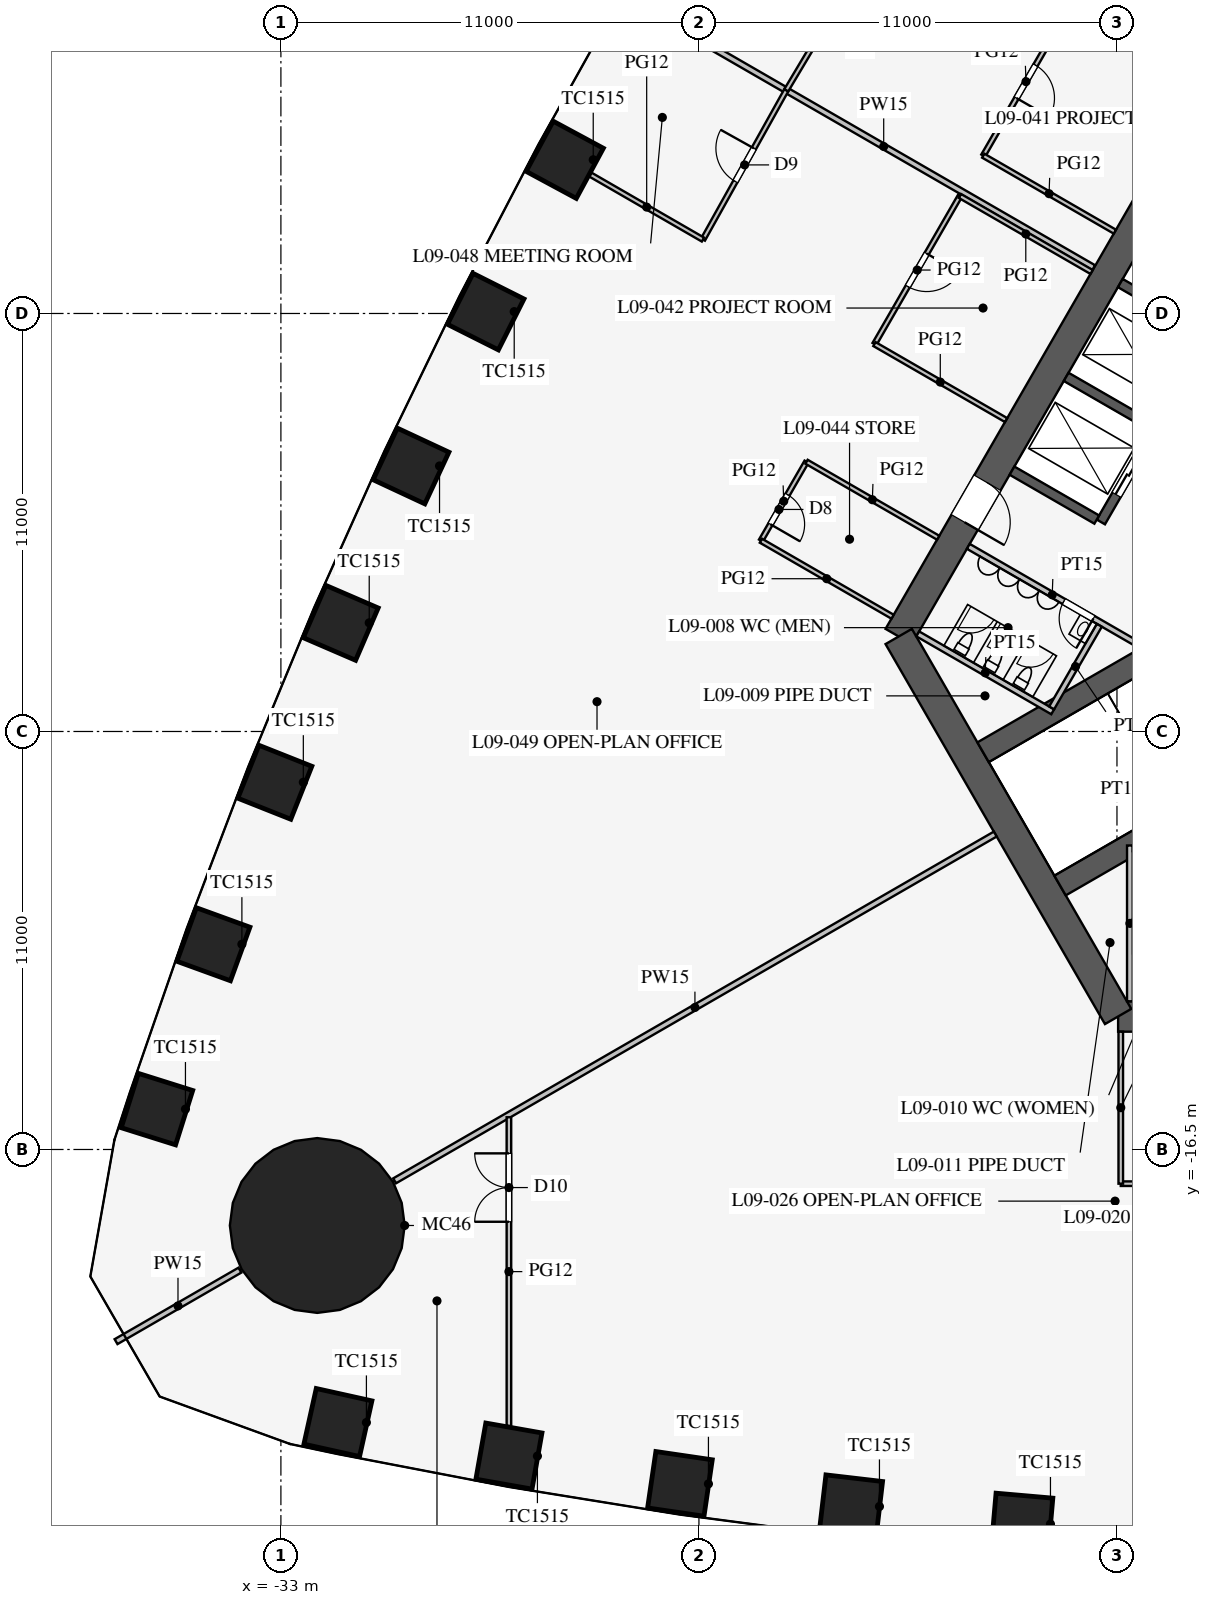
"""IFC4 building model, lengths in metres.
Left out: names, types, materials, properties, quantities, classifications, styles, units other than length and angle.
Written with IfcOpenShell. Run it as: python <this file> out.ifc"""

import sys

from ifc_helpers import new_model, si_unit, direction, frame, frame_2d, origin, origin_2d, place, context, subcontext, project, spatial, rectangle, circle, extrude, element, fill, save


model = new_model("IFC4")
c1 = context("Model", 3, precision=1e-05, world=origin(), true_north=direction((0.0, 1.0)))
c2 = subcontext(c1, "Body", "Model", "MODEL_VIEW")
j1 = project(units=[si_unit("LENGTHUNIT", "METRE"), si_unit("PLANEANGLEUNIT", "RADIAN")], contexts=[c1])
p1 = place(None, origin())
s1 = spatial("IfcSite", under=j1, at=p1, CompositionType="ELEMENT")
p2 = place(p1, origin())
s2 = spatial("IfcBuilding", under=s1, at=p2, CompositionType="ELEMENT")
p3 = place(p2, frame((0.0, 0.0, 41.7)))
s3 = spatial("IfcBuildingStorey", under=s2, at=p3, CompositionType="ELEMENT", Elevation=41.7)
for number, where, z_axis, x_axis in (
    (1, (-31.5, -23.685, 0.0), (0.0, 0.0, 1.0), (0.976, -0.217, 0.0)),
    (2, (-27.0, -24.568, 0.0), (0.0, 0.0, 1.0), (0.985, -0.174, 0.0)),
    (3, (-22.5, -25.299, 0.0), (0.0, 0.0, 1.0), (0.989, -0.145, 0.0)),
    (4, (-18.0, -25.895, 0.0), (0.0, 0.0, 1.0), (0.993, -0.116, 0.0)),
    (5, (-13.5, -26.357, 0.0), (0.0, 0.0, 1.0), (0.996, -0.087, 0.0)),
    (6, (-25.531, 9.544, 0.0), (0.0, 0.0, 1.0), (-0.475, -0.88, 0.0)),
    (7, (-27.611, 5.549, 0.0), (0.0, 0.0, 1.0), (-0.449, -0.894, 0.0)),
    (8, (-29.576, 1.487, 0.0), (0.0, 0.0, 1.0), (-0.423, -0.906, 0.0)),
    (9, (-31.426, -2.641, 0.0), (0.0, 0.0, 1.0), (-0.396, -0.918, 0.0)),
    (10, (-33.16, -6.836, 0.0), (0.0, 0.0, 1.0), (-0.369, -0.929, 0.0)),
    (11, (-34.776, -11.099, 0.0), (0.0, 0.0, 1.0), (-0.342, -0.94, 0.0)),
    (12, (-36.262, -15.438, 0.0), (0.0, 0.0, 1.0), (-0.3, -0.954, 0.0)),
):
    element("IfcColumn", number, at=place(p3, frame(where, z_axis=z_axis, x_axis=x_axis)), inside=s3, PredefinedType="COLUMN", context=c2, shape_type="SweptSolid", body=[
        extrude(rectangle(XDim=1.5, YDim=1.5, at=origin_2d()), origin(), (0.0, 0.0, 1.0), 4.2),
    ])
p4 = place(p3, frame((-32.043, -18.5, 0.0), z_axis=(0.0, 0.0, 1.0), x_axis=(1.0, 0.0, 0.0)))
e13 = element("IfcColumn", 13, at=p4, inside=s3, PredefinedType="COLUMN", context=c2, shape_type="SweptSolid", body=[
    extrude(circle(Radius=2.3, at=origin_2d()), origin(), (0.0, 0.0, 1.0), 4.2),
])
p5 = place(p3, frame((-10.97, -13.0, 0.0), z_axis=(0.0, 0.0, 1.0), x_axis=(1.0, 0.0, 0.0)))
e14 = element("IfcWall", 14, at=p5, inside=s3, PredefinedType="SHEAR", context=c2, shape_type="SweptSolid", body=[
    extrude(rectangle(XDim=21.939, YDim=0.8, at=frame_2d((10.97, 0.0))), origin(), (0.0, 0.0, 1.0), 4.2),
])
p6 = place(p5, frame((17.27, 0.0, 0.0)))
e15 = element("IfcOpeningElement", 15, at=p6, cuts=e14, PredefinedType="OPENING", context=c2, shape_type="SweptSolid", body=[
    extrude(rectangle(XDim=1.2, YDim=2.1, at=frame_2d((0.6, 1.05))), frame((0.0, 0.41, 0.0), z_axis=(0.0, -1.0, 0.0), x_axis=(1.0, 0.0, 0.0)), (0.0, 0.0, 1.0), 0.82),
])
p7 = place(p5, frame((3.47, 0.0, 0.0)))
e16 = element("IfcOpeningElement", 16, at=p7, cuts=e14, PredefinedType="OPENING", context=c2, shape_type="SweptSolid", body=[
    extrude(rectangle(XDim=1.2, YDim=2.1, at=frame_2d((0.6, 1.05))), frame((0.0, 0.41, 0.0), z_axis=(0.0, -1.0, 0.0), x_axis=(1.0, 0.0, 0.0)), (0.0, 0.0, 1.0), 0.82),
])
p8 = place(p3, frame((-5.773, 16.0, 0.0), z_axis=(0.0, 0.0, 1.0), x_axis=(-0.500002442456, -0.866023993627, 0.0)))
e17 = element("IfcWall", 17, at=p8, inside=s3, PredefinedType="SHEAR", context=c2, shape_type="SweptSolid", body=[
    extrude(rectangle(XDim=21.939, YDim=0.8, at=frame_2d((10.97, 0.0))), origin(), (0.0, 0.0, 1.0), 4.2),
])
p9 = place(p8, frame((17.27, 0.0, 0.0)))
e18 = element("IfcOpeningElement", 18, at=p9, cuts=e17, PredefinedType="OPENING", context=c2, shape_type="SweptSolid", body=[
    extrude(rectangle(XDim=1.2, YDim=2.1, at=frame_2d((0.6, 1.05))), frame((0.0, 0.41, 0.0), z_axis=(0.0, -1.0, 0.0), x_axis=(1.0, 0.0, 0.0)), (0.0, 0.0, 1.0), 0.82),
])
p10 = place(p8, frame((3.47, 0.0, 0.0)))
e19 = element("IfcOpeningElement", 19, at=p10, cuts=e17, PredefinedType="OPENING", context=c2, shape_type="SweptSolid", body=[
    extrude(rectangle(XDim=1.2, YDim=2.1, at=frame_2d((0.6, 1.05))), frame((0.0, 0.41, 0.0), z_axis=(0.0, -1.0, 0.0), x_axis=(1.0, 0.0, 0.0)), (0.0, 0.0, 1.0), 0.82),
])
p11 = place(p3, frame((-16.743, -3.0, 0.0), z_axis=(0.0, 0.0, 1.0), x_axis=(0.499995765644, -0.866027848477, 0.0)))
e20 = element("IfcWall", 20, at=p11, inside=s3, PredefinedType="SHEAR", context=c2, shape_type="SweptSolid", body=[
    extrude(rectangle(XDim=11.547, YDim=0.8, at=frame_2d((5.773, 0.0))), origin(), (0.0, 0.0, 1.0), 4.2),
])
p12 = place(p3, frame((-5.724, 9.886, 0.0), z_axis=(0.0, 0.0, 1.0), x_axis=(-0.500001763848, -0.866024385424, 0.0)))
e21 = element("IfcWall", 21, at=p12, inside=s3, PredefinedType="SHEAR", context=c2, shape_type="SweptSolid", body=[
    extrude(rectangle(XDim=11.4, YDim=0.25, at=frame_2d((5.7, 0.0))), origin(), (0.0, 0.0, 1.0), 4.2),
])
p13 = place(p12, frame((6.525, 0.0, 0.0)))
e22 = element("IfcOpeningElement", 22, at=p13, cuts=e21, PredefinedType="OPENING", context=c2, shape_type="SweptSolid", body=[
    extrude(rectangle(XDim=1.2, YDim=2.2, at=frame_2d((0.6, 1.1))), frame((0.0, 0.135, 0.0), z_axis=(0.0, -1.0, 0.0), x_axis=(1.0, 0.0, 0.0)), (0.0, 0.0, 1.0), 0.27),
])
p14 = place(p12, frame((9.375, 0.0, 0.0)))
e23 = element("IfcOpeningElement", 23, at=p14, cuts=e21, PredefinedType="OPENING", context=c2, shape_type="SweptSolid", body=[
    extrude(rectangle(XDim=1.2, YDim=2.2, at=frame_2d((0.6, 1.1))), frame((0.0, 0.135, 0.0), z_axis=(0.0, -1.0, 0.0), x_axis=(1.0, 0.0, 0.0)), (0.0, 0.0, 1.0), 0.27),
])
for number, where, z_axis, x_axis in (
    (24, (-8.682, 5.012, 0.0), (0.0, 0.0, 1.0), (-0.866, 0.5, 0.0)),
    (25, (-10.107, 2.544, 0.0), (0.0, 0.0, 1.0), (-0.866, 0.5, 0.0)),
    (26, (-11.532, 0.076, 0.0), (0.0, 0.0, 1.0), (-0.866, 0.5, 0.0)),
):
    element("IfcWall", number, at=place(p3, frame(where, z_axis=z_axis, x_axis=x_axis)), inside=s3, PredefinedType="SHEAR", context=c2, shape_type="SweptSolid", body=[
        extrude(rectangle(XDim=2.575, YDim=0.25, at=frame_2d((1.288, 0.0))), origin(), (0.0, 0.0, 1.0), 4.2),
    ])
for number, where, z_axis, x_axis in (
    (27, (-6.663, -1.509, 0.0), (0.0, 0.0, 1.0), (-0.866, -0.5, 0.0)),
    (28, (-4.638, -5.016, 0.0), (0.0, 0.0, 1.0), (-0.866, -0.5, 0.0)),
):
    element("IfcWall", number, at=place(p3, frame(where, z_axis=z_axis, x_axis=x_axis)), inside=s3, PredefinedType="SHEAR", context=c2, shape_type="SweptSolid", body=[
        extrude(rectangle(XDim=9.075, YDim=0.6, at=frame_2d((4.538, 0.0))), origin(), (0.0, 0.0, 1.0), 4.2),
    ])
p15 = place(p3, frame((-10.495, -3.178, 0.0), z_axis=(0.0, 0.0, 1.0), x_axis=(-0.86602216432, 0.500005610874, 0.0)))
e29 = element("IfcWall", 29, at=p15, inside=s3, PredefinedType="PARTITIONING", context=c2, shape_type="SweptSolid", body=[
    extrude(rectangle(XDim=5.1, YDim=0.15, at=frame_2d((2.55, 0.0))), origin(), (0.0, 0.0, 1.0), 4.0),
])
p16 = place(p15, frame((1.3, 0.0, 0.0)))
e30 = element("IfcOpeningElement", 30, at=p16, cuts=e29, PredefinedType="OPENING", context=c2, shape_type="SweptSolid", body=[
    extrude(rectangle(XDim=0.9, YDim=2.1, at=frame_2d((0.45, 1.05))), frame((0.0, 0.085, 0.0), z_axis=(0.0, -1.0, 0.0), x_axis=(1.0, 0.0, 0.0)), (0.0, 0.0, 1.0), 0.17),
])
p17 = place(p3, frame((-12.691, -4.982, 0.0), z_axis=(0.0, 0.0, 1.0), x_axis=(-0.8660249478, 0.500000789788, 0.0)))
e31 = element("IfcWall", 31, at=p17, inside=s3, PredefinedType="PARTITIONING", context=c2, shape_type="SweptSolid", body=[
    extrude(rectangle(XDim=4.1, YDim=0.15, at=frame_2d((2.05, 0.0))), origin(), (0.0, 0.0, 1.0), 4.0),
])
p18 = place(p3, frame((-11.464, -2.706, 0.0), z_axis=(0.0, 0.0, 1.0), x_axis=(-0.50001992892, -0.866013897511, 0.0)))
e32 = element("IfcWall", 32, at=p18, inside=s3, PredefinedType="PARTITIONING", context=c2, shape_type="SweptSolid", body=[
    extrude(rectangle(XDim=2.51, YDim=0.15, at=frame_2d((1.255, 0.0))), origin(), (0.0, 0.0, 1.0), 4.0),
])
p19 = place(p3, frame((-10.66, -8.5, 0.0), z_axis=(0.0, 0.0, 1.0), x_axis=(0.0, -1.0, 0.0)))
e33 = element("IfcWall", 33, at=p19, inside=s3, PredefinedType="PARTITIONING", context=c2, shape_type="SweptSolid", body=[
    extrude(rectangle(XDim=4.1, YDim=0.15, at=frame_2d((2.05, 0.0))), origin(), (0.0, 0.0, 1.0), 4.0),
])
p20 = place(p3, frame((-14.203, -8.2, 0.0), z_axis=(0.0, 0.0, 1.0), x_axis=(-0.866024965723, -0.500000758745, 0.0)))
e34 = element("IfcWall", 34, at=p20, inside=s3, PredefinedType="PARTITIONING", context=c2, shape_type="SweptSolid", body=[
    extrude(rectangle(XDim=18.25, YDim=0.15, at=frame_2d((9.125, 0.0))), origin(), (0.0, 0.0, 1.0), 2.3),
])
p21 = place(p3, frame((-34.078, -19.675, 0.0), z_axis=(0.0, 0.0, 1.0), x_axis=(-0.866019247219, -0.500010663332, 0.0)))
e35 = element("IfcWall", 35, at=p21, inside=s3, PredefinedType="PARTITIONING", context=c2, shape_type="SweptSolid", body=[
    extrude(rectangle(XDim=3.764, YDim=0.15, at=frame_2d((1.882, 0.0))), origin(), (0.0, 0.0, 1.0), 2.3),
])
p22 = place(p3, frame((-10.9, -17.4, 0.0), z_axis=(0.0, 0.0, 1.0), x_axis=(1.0, 0.0, 0.0)))
e36 = element("IfcWall", 36, at=p22, inside=s3, PredefinedType="PARTITIONING", context=c2, shape_type="SweptSolid", body=[
    extrude(rectangle(XDim=2.4, YDim=0.12, at=frame_2d((1.2, 0.0))), origin(), (0.0, 0.0, 1.0), 2.9),
])
p23 = place(p22, frame((0.75, 0.0, 0.15)))
e37 = element("IfcOpeningElement", 37, at=p23, cuts=e36, PredefinedType="OPENING", context=c2, shape_type="SweptSolid", body=[
    extrude(rectangle(XDim=0.9, YDim=2.1, at=frame_2d((0.45, 1.05))), frame((0.0, 0.07, 0.0), z_axis=(0.0, -1.0, 0.0), x_axis=(1.0, 0.0, 0.0)), (0.0, 0.0, 1.0), 0.14),
])
p24 = place(p3, frame((-10.9, -13.4, 0.0), z_axis=(0.0, 0.0, 1.0), x_axis=(0.0, -1.0, 0.0)))
e38 = element("IfcWall", 38, at=p24, inside=s3, PredefinedType="PARTITIONING", context=c2, shape_type="SweptSolid", body=[
    extrude(rectangle(XDim=4.0, YDim=0.12, at=frame_2d((2.0, 0.0))), origin(), (0.0, 0.0, 1.0), 2.9),
])
p25 = place(p3, frame((-27.0, -15.652, 0.0), z_axis=(0.0, 0.0, 1.0), x_axis=(0.0, -1.0, 0.0)))
e39 = element("IfcWall", 39, at=p25, inside=s3, PredefinedType="PARTITIONING", context=c2, shape_type="SweptSolid", body=[
    extrude(rectangle(XDim=8.124, YDim=0.12, at=frame_2d((4.062, 0.0))), origin(), (0.0, 0.0, 1.0), 2.9),
])
p26 = place(p25, frame((0.95, 0.0, 0.15)))
e40 = element("IfcOpeningElement", 40, at=p26, cuts=e39, PredefinedType="OPENING", context=c2, shape_type="SweptSolid", body=[
    extrude(rectangle(XDim=1.8, YDim=2.1, at=frame_2d((0.9, 1.05))), frame((0.0, 0.07, 0.0), z_axis=(0.0, -1.0, 0.0), x_axis=(1.0, 0.0, 0.0)), (0.0, 0.0, 1.0), 0.14),
])
p27 = place(p3, frame((-11.613, 6.705, 0.0), z_axis=(0.0, 0.0, 1.0), x_axis=(-0.86602785495, 0.499995754432, 0.0)))
e41 = element("IfcWall", 41, at=p27, inside=s3, PredefinedType="PARTITIONING", context=c2, shape_type="SweptSolid", body=[
    extrude(rectangle(XDim=12.759, YDim=0.15, at=frame_2d((6.379, 0.0))), origin(), (0.0, 0.0, 1.0), 3.2),
])
p28 = place(p3, frame((-15.131, 8.592, 0.0), z_axis=(0.0, 0.0, 1.0), x_axis=(-0.499990139034, -0.866031096941, 0.0)))
e42 = element("IfcWall", 42, at=p28, inside=s3, PredefinedType="PARTITIONING", context=c2, shape_type="SweptSolid", body=[
    extrude(rectangle(XDim=4.5, YDim=0.12, at=frame_2d((2.25, 0.0))), origin(), (0.0, 0.0, 1.0), 2.9),
])
p29 = place(p28, frame((1.75, 0.0, 0.15)))
e43 = element("IfcOpeningElement", 43, at=p29, cuts=e42, PredefinedType="OPENING", context=c2, shape_type="SweptSolid", body=[
    extrude(rectangle(XDim=1.0, YDim=2.1, at=frame_2d((0.5, 1.05))), frame((0.0, 0.07, 0.0), z_axis=(0.0, -1.0, 0.0), x_axis=(1.0, 0.0, 0.0)), (0.0, 0.0, 1.0), 0.14),
])
p30 = place(p3, frame((-19.169, 1.599, 0.0), z_axis=(0.0, 0.0, 1.0), x_axis=(-0.499957262057, -0.866050077142, 0.0)))
e44 = element("IfcWall", 44, at=p30, inside=s3, PredefinedType="PARTITIONING", context=c2, shape_type="SweptSolid", body=[
    extrude(rectangle(XDim=2.4, YDim=0.12, at=frame_2d((1.2, 0.0))), origin(), (0.0, 0.0, 1.0), 2.9),
])
p31 = place(p30, frame((1.0, 0.0, 0.15)))
e45 = element("IfcOpeningElement", 45, at=p31, cuts=e44, PredefinedType="OPENING", context=c2, shape_type="SweptSolid", body=[
    extrude(rectangle(XDim=0.9, YDim=2.1, at=frame_2d((0.45, 1.05))), frame((0.0, 0.07, 0.0), z_axis=(0.0, -1.0, 0.0), x_axis=(1.0, 0.0, 0.0)), (0.0, 0.0, 1.0), 0.14),
])
p32 = place(p3, frame((-12.269, 13.55, 0.0), z_axis=(0.0, 0.0, 1.0), x_axis=(-0.499990139034, -0.866031096941, 0.0)))
e46 = element("IfcWall", 46, at=p32, inside=s3, PredefinedType="PARTITIONING", context=c2, shape_type="SweptSolid", body=[
    extrude(rectangle(XDim=4.5, YDim=0.12, at=frame_2d((2.25, 0.0))), origin(), (0.0, 0.0, 1.0), 2.9),
])
p33 = place(p32, frame((1.75, 0.0, 0.15)))
e47 = element("IfcOpeningElement", 47, at=p33, cuts=e46, PredefinedType="OPENING", context=c2, shape_type="SweptSolid", body=[
    extrude(rectangle(XDim=1.0, YDim=2.1, at=frame_2d((0.5, 1.05))), frame((0.0, 0.07, 0.0), z_axis=(0.0, -1.0, 0.0), x_axis=(1.0, 0.0, 0.0)), (0.0, 0.0, 1.0), 0.14),
])
for number, where, z_axis, x_axis in (
    (48, (-11.667, 6.592, 0.0), (0.0, 0.0, 1.0), (-0.866, 0.5, 0.0)),
    (49, (-16.905, -2.48, 0.0), (0.0, 0.0, 1.0), (-0.866, 0.5, 0.0)),
    (50, (-13.917, 2.695, 0.0), (0.0, 0.0, 1.0), (-0.866, 0.5, 0.0)),
    (51, (-15.705, -0.401, 0.0), (0.0, 0.0, 1.0), (-0.866, 0.5, 0.0)),
    (52, (-11.055, 7.653, 0.0), (0.0, 0.0, 1.0), (-0.866, 0.5, 0.0)),
    (53, (-8.805, 11.55, 0.0), (0.0, 0.0, 1.0), (-0.866, 0.5, 0.0)),
):
    element("IfcWall", number, at=place(p3, frame(where, z_axis=z_axis, x_axis=x_axis)), inside=s3, PredefinedType="PARTITIONING", context=c2, shape_type="SweptSolid", body=[
        extrude(rectangle(XDim=4.0, YDim=0.12, at=frame_2d((2.0, 0.0))), origin(), (0.0, 0.0, 1.0), 2.9),
    ])
p34 = place(p3, frame((-19.701, 11.374, 0.0), z_axis=(0.0, 0.0, 1.0), x_axis=(-0.487415216275, -0.87317031955, 0.0)))
e54 = element("IfcWall", 54, at=p34, inside=s3, PredefinedType="PARTITIONING", context=c2, shape_type="SweptSolid", body=[
    extrude(rectangle(XDim=4.5, YDim=0.12, at=frame_2d((2.25, 0.0))), origin(), (0.0, 0.0, 1.0), 2.9),
])
p35 = place(p34, frame((1.75, 0.0, 0.15)))
e55 = element("IfcOpeningElement", 55, at=p35, cuts=e54, PredefinedType="OPENING", context=c2, shape_type="SweptSolid", body=[
    extrude(rectangle(XDim=1.0, YDim=2.1, at=frame_2d((0.5, 1.05))), frame((0.0, 0.07, 0.0), z_axis=(0.0, -1.0, 0.0), x_axis=(1.0, 0.0, 0.0)), (0.0, 0.0, 1.0), 0.14),
])
p36 = place(p3, frame((-17.395, 15.239, 0.0), z_axis=(0.0, 0.0, 1.0), x_axis=(-0.512483962191, -0.858696796604, 0.0)))
e56 = element("IfcWall", 56, at=p36, inside=s3, PredefinedType="PARTITIONING", context=c2, shape_type="SweptSolid", body=[
    extrude(rectangle(XDim=4.5, YDim=0.12, at=frame_2d((2.25, 0.0))), origin(), (0.0, 0.0, 1.0), 2.9),
])
p37 = place(p36, frame((1.8, 0.0, 0.15)))
e57 = element("IfcOpeningElement", 57, at=p37, cuts=e56, PredefinedType="OPENING", context=c2, shape_type="SweptSolid", body=[
    extrude(rectangle(XDim=0.9, YDim=2.1, at=frame_2d((0.45, 1.05))), frame((0.0, 0.07, 0.0), z_axis=(0.0, -1.0, 0.0), x_axis=(1.0, 0.0, 0.0)), (0.0, 0.0, 1.0), 0.14),
])
p38 = place(p3, frame((-21.895, 7.445, 0.0), z_axis=(0.0, 0.0, 1.0), x_axis=(-0.866015553834, 0.500017060227, 0.0)))
e58 = element("IfcWall", 58, at=p38, inside=s3, PredefinedType="PARTITIONING", context=c2, shape_type="SweptSolid", body=[
    extrude(rectangle(XDim=3.419, YDim=0.12, at=frame_2d((1.71, 0.0))), origin(), (0.0, 0.0, 1.0), 2.9),
])
p39 = place(p16, origin())
e59 = element("IfcDoor", 59, at=p39, inside=s3, OperationType="SINGLE_SWING_LEFT", PredefinedType="DOOR", context=c2, shape_type="SweptSolid", body=[
    extrude(rectangle(XDim=0.9, YDim=2.1, at=frame_2d((0.45, 1.05))), frame((0.0, 0.025, 0.0), z_axis=(0.0, -1.0, 0.0), x_axis=(1.0, 0.0, 0.0)), (0.0, 0.0, 1.0), 0.05),
])
fill(e30, e59)
p40 = place(p9, origin())
e60 = element("IfcDoor", 60, at=p40, inside=s3, OperationType="SINGLE_SWING_RIGHT", PredefinedType="DOOR", context=c2, shape_type="SweptSolid", body=[
    extrude(rectangle(XDim=1.2, YDim=2.1, at=frame_2d((0.6, 1.05))), frame((0.0, 0.025, 0.0), z_axis=(0.0, -1.0, 0.0), x_axis=(1.0, 0.0, 0.0)), (0.0, 0.0, 1.0), 0.05),
])
fill(e18, e60)
p41 = place(p26, frame((1.8, 0.0, 0.0), z_axis=(0.0, 0.0, 1.0), x_axis=(-1.0, 0.0, 0.0)))
e61 = element("IfcDoor", 61, at=p41, inside=s3, OperationType="DOUBLE_DOOR_SINGLE_SWING", PredefinedType="DOOR", context=c2, shape_type="SweptSolid", body=[
    extrude(rectangle(XDim=1.8, YDim=2.1, at=frame_2d((0.9, 1.05))), frame((0.0, 0.025, 0.0), z_axis=(0.0, -1.0, 0.0), x_axis=(1.0, 0.0, 0.0)), (0.0, 0.0, 1.0), 0.05),
])
fill(e40, e61)
p42 = place(p33, origin())
e62 = element("IfcDoor", 62, at=p42, inside=s3, OperationType="SINGLE_SWING_RIGHT", PredefinedType="DOOR", context=c2, shape_type="SweptSolid", body=[
    extrude(rectangle(XDim=1.0, YDim=2.1, at=frame_2d((0.5, 1.05))), frame((0.0, 0.025, 0.0), z_axis=(0.0, -1.0, 0.0), x_axis=(1.0, 0.0, 0.0)), (0.0, 0.0, 1.0), 0.05),
])
fill(e47, e62)
p43 = place(p29, origin())
e63 = element("IfcDoor", 63, at=p43, inside=s3, OperationType="SINGLE_SWING_LEFT", PredefinedType="DOOR", context=c2, shape_type="SweptSolid", body=[
    extrude(rectangle(XDim=1.0, YDim=2.1, at=frame_2d((0.5, 1.05))), frame((0.0, 0.025, 0.0), z_axis=(0.0, -1.0, 0.0), x_axis=(1.0, 0.0, 0.0)), (0.0, 0.0, 1.0), 0.05),
])
fill(e43, e63)
p44 = place(p31, origin())
e64 = element("IfcDoor", 64, at=p44, inside=s3, OperationType="SINGLE_SWING_RIGHT", PredefinedType="DOOR", context=c2, shape_type="SweptSolid", body=[
    extrude(rectangle(XDim=0.9, YDim=2.1, at=frame_2d((0.45, 1.05))), frame((0.0, 0.025, 0.0), z_axis=(0.0, -1.0, 0.0), x_axis=(1.0, 0.0, 0.0)), (0.0, 0.0, 1.0), 0.05),
])
fill(e45, e64)
p45 = place(p35, frame((1.0, 0.0, 0.0), z_axis=(0.0, 0.0, 1.0), x_axis=(-1.0, 0.0, 0.0)))
e65 = element("IfcDoor", 65, at=p45, inside=s3, OperationType="SINGLE_SWING_RIGHT", PredefinedType="DOOR", context=c2, shape_type="SweptSolid", body=[
    extrude(rectangle(XDim=1.0, YDim=2.1, at=frame_2d((0.5, 1.05))), frame((0.0, 0.025, 0.0), z_axis=(0.0, -1.0, 0.0), x_axis=(1.0, 0.0, 0.0)), (0.0, 0.0, 1.0), 0.05),
])
fill(e55, e65)
p46 = place(p14, origin())
e66 = element("IfcDoor", 66, at=p46, inside=s3, OperationType="DOUBLE_DOOR_SLIDING", PredefinedType="DOOR", context=c2, shape_type="SweptSolid", body=[
    extrude(rectangle(XDim=1.2, YDim=2.2, at=frame_2d((0.6, 1.1))), frame((0.0, 0.025, 0.0), z_axis=(0.0, -1.0, 0.0), x_axis=(1.0, 0.0, 0.0)), (0.0, 0.0, 1.0), 0.05),
])
fill(e23, e66)
save(model, sys.argv[1])
